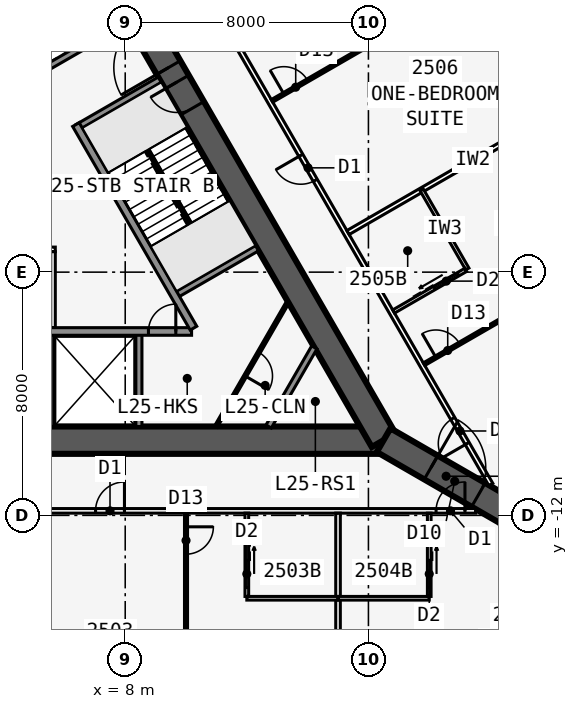
"""IFC4 building model, lengths in metres.
Left out: names, types, materials, properties, quantities, classifications, styles, units other than length and angle.
Written with IfcOpenShell. Run it as: python <this file> out.ifc"""

import sys

from ifc_helpers import new_model, si_unit, direction, frame, frame_2d, origin, place, context, subcontext, project, spatial, rectangle, extrude, element, fill, save


model = new_model("IFC4")
c1 = context("Model", 3, precision=1e-05, world=origin(), true_north=direction((0.0, 1.0)))
c2 = subcontext(c1, "Body", "Model", "MODEL_VIEW")
j1 = project(units=[si_unit("LENGTHUNIT", "METRE"), si_unit("PLANEANGLEUNIT", "RADIAN")], contexts=[c1])
p1 = place(None, origin())
s1 = spatial("IfcSite", under=j1, at=p1, CompositionType="ELEMENT")
p2 = place(p1, origin())
s2 = spatial("IfcBuilding", under=s1, at=p2, CompositionType="ELEMENT")
p3 = place(p2, frame((0.0, 0.0, 96.5)))
s3 = spatial("IfcBuildingStorey", under=s2, at=p3, CompositionType="ELEMENT", Elevation=96.5)
p4 = place(p3, frame((-16.5, -9.526, 0.0), z_axis=(0.0, 0.0, 1.0), x_axis=(1.0, 0.0, 0.0)))
e1 = element("IfcWall", 1, at=p4, inside=s3, PredefinedType="SHEAR", context=c2, shape_type="SweptSolid", body=[
    extrude(rectangle(XDim=33.0, YDim=0.9, at=frame_2d((16.5, 0.0))), origin(), (0.0, 0.0, 1.0), 3.4),
])
p5 = place(p4, frame((14.05, 0.0, 0.0)))
e2 = element("IfcOpeningElement", 2, at=p5, cuts=e1, PredefinedType="OPENING", context=c2, shape_type="SweptSolid", body=[
    extrude(rectangle(XDim=1.8, YDim=2.13, at=frame_2d((0.9, 1.065))), frame((0.0, 0.46, 0.0), z_axis=(0.0, -1.0, 0.0), x_axis=(1.0, 0.0, 0.0)), (0.0, 0.0, 1.0), 0.92),
])
p6 = place(p3, frame((-0.55, -5.951, 0.0), z_axis=(0.0, 0.0, 1.0), x_axis=(1.0, 0.0, 0.0)))
e3 = element("IfcWall", 3, at=p6, inside=s3, PredefinedType="SOLIDWALL", context=c2, shape_type="SweptSolid", body=[
    extrude(rectangle(XDim=10.733, YDim=0.25, at=frame_2d((5.366, 0.0))), origin(), (0.0, 0.0, 1.0), 3.235),
])
p7 = place(p6, frame((9.314, 0.0, 0.0)))
e4 = element("IfcOpeningElement", 4, at=p7, cuts=e3, PredefinedType="OPENING", context=c2, shape_type="SweptSolid", body=[
    extrude(rectangle(XDim=0.9, YDim=2.13, at=frame_2d((0.45, 1.065))), frame((0.0, 0.135, 0.0), z_axis=(0.0, -1.0, 0.0), x_axis=(1.0, 0.0, 0.0)), (0.0, 0.0, 1.0), 0.27),
])
p8 = place(p6, frame((1.05, 0.0, 0.0)))
e5 = element("IfcOpeningElement", 5, at=p8, cuts=e3, PredefinedType="OPENING", context=c2, shape_type="SweptSolid", body=[
    extrude(rectangle(XDim=1.1, YDim=2.13, at=frame_2d((0.55, 1.065))), frame((0.0, 0.135, 0.0), z_axis=(0.0, -1.0, 0.0), x_axis=(1.0, 0.0, 0.0)), (0.0, 0.0, 1.0), 0.27),
])
p9 = place(p6, frame((4.05, 0.0, 0.0)))
e6 = element("IfcOpeningElement", 6, at=p9, cuts=e3, PredefinedType="OPENING", context=c2, shape_type="SweptSolid", body=[
    extrude(rectangle(XDim=1.1, YDim=2.13, at=frame_2d((0.55, 1.065))), frame((0.0, 0.135, 0.0), z_axis=(0.0, -1.0, 0.0), x_axis=(1.0, 0.0, 0.0)), (0.0, 0.0, 1.0), 0.27),
])
for number, where, z_axis, x_axis in (
    (7, (5.55, -5.951, 0.0), (0.0, 0.0, 1.0), (0.0, -1.0, 0.0)),
    (8, (8.45, -5.951, 0.0), (0.0, 0.0, 1.0), (0.0, -1.0, 0.0)),
):
    element("IfcWall", number, at=place(p3, frame(where, z_axis=z_axis, x_axis=x_axis)), inside=s3, PredefinedType="SOLIDWALL", context=c2, shape_type="SweptSolid", body=[
        extrude(rectangle(XDim=3.125, YDim=0.2, at=frame_2d((1.562, 0.0))), origin(), (0.0, 0.0, 1.0), 3.235),
    ])
p10 = place(p3, frame((16.5, -9.526, 0.0), z_axis=(0.0, 0.0, 1.0), x_axis=(-0.499999749417, 0.866025548458, 0.0)))
e9 = element("IfcWall", 9, at=p10, inside=s3, PredefinedType="SHEAR", context=c2, shape_type="SweptSolid", body=[
    extrude(rectangle(XDim=33.0, YDim=0.9, at=frame_2d((16.5, 0.0))), origin(), (0.0, 0.0, 1.0), 3.4),
])
p11 = place(p10, frame((14.15, 0.0, 0.0)))
e10 = element("IfcOpeningElement", 10, at=p11, cuts=e9, PredefinedType="OPENING", context=c2, shape_type="SweptSolid", body=[
    extrude(rectangle(XDim=1.8, YDim=2.13, at=frame_2d((0.9, 1.065))), frame((0.0, 0.46, 0.0), z_axis=(0.0, -1.0, 0.0), x_axis=(1.0, 0.0, 0.0)), (0.0, 0.0, 1.0), 0.92),
])
p12 = place(p10, frame((12.6, 0.0, 0.0)))
e11 = element("IfcOpeningElement", 11, at=p12, cuts=e9, PredefinedType="OPENING", context=c2, shape_type="SweptSolid", body=[
    extrude(rectangle(XDim=1.0, YDim=2.13, at=frame_2d((0.5, 1.065))), frame((0.0, 0.46, 0.0), z_axis=(0.0, -1.0, 0.0), x_axis=(1.0, 0.0, 0.0)), (0.0, 0.0, 1.0), 0.92),
])
p13 = place(p3, frame((10.245, -5.843, 0.0), z_axis=(0.0, 0.0, 1.0), x_axis=(-0.499993009313, 0.866029439822, 0.0)))
e12 = element("IfcWall", 12, at=p13, inside=s3, PredefinedType="SOLIDWALL", context=c2, shape_type="SweptSolid", body=[
    extrude(rectangle(XDim=7.733, YDim=0.25, at=frame_2d((3.866, 0.0))), origin(), (0.0, 0.0, 1.0), 3.235),
])
for number, where, z_axis, x_axis in (
    (13, (9.629, -4.775, 0.0), (0.0, 0.0, 1.0), (0.866, 0.5, 0.0)),
    (14, (6.429, 0.767, 0.0), (0.0, 0.0, 1.0), (0.866, 0.5, 0.0)),
    (15, (5.329, 2.673, 0.0), (0.0, 0.0, 1.0), (0.866, 0.5, 0.0)),
):
    element("IfcWall", number, at=place(p3, frame(where, z_axis=z_axis, x_axis=x_axis)), inside=s3, PredefinedType="SOLIDWALL", context=c2, shape_type="SweptSolid", body=[
        extrude(rectangle(XDim=3.125, YDim=0.2, at=frame_2d((1.562, 0.0))), origin(), (0.0, 0.0, 1.0), 3.235),
    ])
p14 = place(p3, frame((16.5, -9.526, 0.0), z_axis=(0.0, 0.0, 1.0), x_axis=(0.866031398331, -0.499989616998, 0.0)))
e16 = element("IfcWall", 16, at=p14, inside=s3, PredefinedType="SHEAR", context=c2, shape_type="SweptSolid", body=[
    extrude(rectangle(XDim=4.746, YDim=0.9, at=frame_2d((2.373, 0.0))), origin(), (0.0, 0.0, 1.0), 3.4),
])
p15 = place(p14, frame((1.8, 0.0, 0.0)))
e17 = element("IfcOpeningElement", 17, at=p15, cuts=e16, PredefinedType="OPENING", context=c2, shape_type="SweptSolid", body=[
    extrude(rectangle(XDim=1.8, YDim=2.13, at=frame_2d((0.9, 1.065))), frame((0.0, 0.46, 0.0), z_axis=(0.0, -1.0, 0.0), x_axis=(1.0, 0.0, 0.0)), (0.0, 0.0, 1.0), 0.92),
])
p16 = place(p3, frame((-19.527, -11.851, 0.0), z_axis=(0.0, 0.0, 1.0), x_axis=(1.0, 0.0, 0.0)))
e18 = element("IfcWall", 18, at=p16, inside=s3, PredefinedType="PARTITIONING", context=c2, shape_type="SweptSolid", body=[
    extrude(rectangle(XDim=39.054, YDim=0.15, at=frame_2d((19.527, 0.0))), origin(), (0.0, 0.0, 1.0), 3.235),
])
p17 = place(p16, frame((1.558, 0.0, 0.0)))
e19 = element("IfcOpeningElement", 19, at=p17, cuts=e18, PredefinedType="OPENING", context=c2, shape_type="SweptSolid", body=[
    extrude(rectangle(XDim=0.95, YDim=2.13, at=frame_2d((0.475, 1.065))), frame((0.0, 0.085, 0.0), z_axis=(0.0, -1.0, 0.0), x_axis=(1.0, 0.0, 0.0)), (0.0, 0.0, 1.0), 0.17),
])
p18 = place(p16, frame((11.552, 0.0, 0.0)))
e20 = element("IfcOpeningElement", 20, at=p18, cuts=e18, PredefinedType="OPENING", context=c2, shape_type="SweptSolid", body=[
    extrude(rectangle(XDim=0.95, YDim=2.13, at=frame_2d((0.475, 1.065))), frame((0.0, 0.085, 0.0), z_axis=(0.0, -1.0, 0.0), x_axis=(1.0, 0.0, 0.0)), (0.0, 0.0, 1.0), 0.17),
])
p19 = place(p16, frame((21.527, 0.0, 0.0)))
e21 = element("IfcOpeningElement", 21, at=p19, cuts=e18, PredefinedType="OPENING", context=c2, shape_type="SweptSolid", body=[
    extrude(rectangle(XDim=1.0, YDim=2.13, at=frame_2d((0.5, 1.065))), frame((0.0, 0.085, 0.0), z_axis=(0.0, -1.0, 0.0), x_axis=(1.0, 0.0, 0.0)), (0.0, 0.0, 1.0), 0.17),
])
p20 = place(p16, frame((26.552, 0.0, 0.0)))
e22 = element("IfcOpeningElement", 22, at=p20, cuts=e18, PredefinedType="OPENING", context=c2, shape_type="SweptSolid", body=[
    extrude(rectangle(XDim=0.95, YDim=2.13, at=frame_2d((0.475, 1.065))), frame((0.0, 0.085, 0.0), z_axis=(0.0, -1.0, 0.0), x_axis=(1.0, 0.0, 0.0)), (0.0, 0.0, 1.0), 0.17),
])
p21 = place(p16, frame((37.752, 0.0, 0.0)))
e23 = element("IfcOpeningElement", 23, at=p21, cuts=e18, PredefinedType="OPENING", context=c2, shape_type="SweptSolid", body=[
    extrude(rectangle(XDim=0.95, YDim=2.13, at=frame_2d((0.475, 1.065))), frame((0.0, 0.085, 0.0), z_axis=(0.0, -1.0, 0.0), x_axis=(1.0, 0.0, 0.0)), (0.0, 0.0, 1.0), 0.17),
])
p22 = place(p3, frame((10.0, -11.926, 0.0), z_axis=(0.0, 0.0, 1.0), x_axis=(0.0, -1.0, 0.0)))
e24 = element("IfcWall", 24, at=p22, inside=s3, PredefinedType="PARTITIONING", context=c2, shape_type="SweptSolid", body=[
    extrude(rectangle(XDim=9.485, YDim=0.1, at=frame_2d((4.742, 0.0))), origin(), (0.0, 0.0, 1.0), 2.389),
])
p23 = place(p22, frame((0.45, 0.0, 0.0)))
e25 = element("IfcOpeningElement", 25, at=p23, cuts=e24, PredefinedType="OPENING", context=c2, shape_type="SweptSolid", body=[
    extrude(rectangle(XDim=0.9, YDim=2.13, at=frame_2d((0.45, 1.065))), frame((0.0, 0.06, 0.0), z_axis=(0.0, -1.0, 0.0), x_axis=(1.0, 0.0, 0.0)), (0.0, 0.0, 1.0), 0.12),
])
p24 = place(p3, frame((15.0, -11.926, 0.0), z_axis=(0.0, 0.0, 1.0), x_axis=(0.0, -1.0, 0.0)))
e26 = element("IfcWall", 26, at=p24, inside=s3, PredefinedType="PARTITIONING", context=c2, shape_type="SweptSolid", body=[
    extrude(rectangle(XDim=8.72, YDim=0.15, at=frame_2d((4.36, 0.0))), origin(), (0.0, 0.0, 1.0), 2.389),
])
p25 = place(p3, frame((12.0, -14.726, 0.0), z_axis=(0.0, 0.0, 1.0), x_axis=(1.0, 0.0, 0.0)))
e27 = element("IfcWall", 27, at=p25, inside=s3, PredefinedType="PLUMBINGWALL", context=c2, shape_type="SweptSolid", body=[
    extrude(rectangle(XDim=3.0, YDim=0.12, at=frame_2d((1.5, 0.0))), origin(), (0.0, 0.0, 1.0), 3.235),
])
p26 = place(p3, frame((12.0, -11.926, 0.0), z_axis=(0.0, 0.0, 1.0), x_axis=(0.0, -1.0, 0.0)))
e28 = element("IfcWall", 28, at=p26, inside=s3, PredefinedType="PLUMBINGWALL", context=c2, shape_type="SweptSolid", body=[
    extrude(rectangle(XDim=2.74, YDim=0.12, at=frame_2d((1.37, 0.0))), origin(), (0.0, 0.0, 1.0), 3.235),
])
p27 = place(p26, frame((1.55, 0.0, 0.0)))
e29 = element("IfcOpeningElement", 29, at=p27, cuts=e28, PredefinedType="OPENING", context=c2, shape_type="SweptSolid", body=[
    extrude(rectangle(XDim=0.9, YDim=2.13, at=frame_2d((0.45, 1.065))), frame((0.0, 0.07, 0.0), z_axis=(0.0, -1.0, 0.0), x_axis=(1.0, 0.0, 0.0)), (0.0, 0.0, 1.0), 0.14),
])
p28 = place(p3, frame((15.0, -14.726, 0.0), z_axis=(0.0, 0.0, 1.0), x_axis=(1.0, 0.0, 0.0)))
e30 = element("IfcWall", 30, at=p28, inside=s3, PredefinedType="PLUMBINGWALL", context=c2, shape_type="SweptSolid", body=[
    extrude(rectangle(XDim=3.0, YDim=0.12, at=frame_2d((1.5, 0.0))), origin(), (0.0, 0.0, 1.0), 3.235),
])
p29 = place(p3, frame((18.0, -11.926, 0.0), z_axis=(0.0, 0.0, 1.0), x_axis=(0.0, -1.0, 0.0)))
e31 = element("IfcWall", 31, at=p29, inside=s3, PredefinedType="PLUMBINGWALL", context=c2, shape_type="SweptSolid", body=[
    extrude(rectangle(XDim=2.74, YDim=0.12, at=frame_2d((1.37, 0.0))), origin(), (0.0, 0.0, 1.0), 3.235),
])
p30 = place(p29, frame((1.55, 0.0, 0.0)))
e32 = element("IfcOpeningElement", 32, at=p30, cuts=e31, PredefinedType="OPENING", context=c2, shape_type="SweptSolid", body=[
    extrude(rectangle(XDim=0.9, YDim=2.13, at=frame_2d((0.45, 1.065))), frame((0.0, 0.07, 0.0), z_axis=(0.0, -1.0, 0.0), x_axis=(1.0, 0.0, 0.0)), (0.0, 0.0, 1.0), 0.14),
])
p31 = place(p3, frame((20.027, -10.985, 0.0), z_axis=(0.0, 0.0, 1.0), x_axis=(-0.500001677587, 0.866024435227, 0.0)))
e33 = element("IfcWall", 33, at=p31, inside=s3, PredefinedType="PARTITIONING", context=c2, shape_type="SweptSolid", body=[
    extrude(rectangle(XDim=39.054, YDim=0.15, at=frame_2d((19.527, 0.0))), origin(), (0.0, 0.0, 1.0), 3.235),
])
p32 = place(p31, frame((1.558, 0.0, 0.0)))
e34 = element("IfcOpeningElement", 34, at=p32, cuts=e33, PredefinedType="OPENING", context=c2, shape_type="SweptSolid", body=[
    extrude(rectangle(XDim=0.95, YDim=2.13, at=frame_2d((0.475, 1.065))), frame((0.0, 0.085, 0.0), z_axis=(0.0, -1.0, 0.0), x_axis=(1.0, 0.0, 0.0)), (0.0, 0.0, 1.0), 0.17),
])
p33 = place(p31, frame((11.552, 0.0, 0.0)))
e35 = element("IfcOpeningElement", 35, at=p33, cuts=e33, PredefinedType="OPENING", context=c2, shape_type="SweptSolid", body=[
    extrude(rectangle(XDim=0.95, YDim=2.13, at=frame_2d((0.475, 1.065))), frame((0.0, 0.085, 0.0), z_axis=(0.0, -1.0, 0.0), x_axis=(1.0, 0.0, 0.0)), (0.0, 0.0, 1.0), 0.17),
])
p34 = place(p31, frame((22.752, 0.0, 0.0)))
e36 = element("IfcOpeningElement", 36, at=p34, cuts=e33, PredefinedType="OPENING", context=c2, shape_type="SweptSolid", body=[
    extrude(rectangle(XDim=0.95, YDim=2.13, at=frame_2d((0.475, 1.065))), frame((0.0, 0.085, 0.0), z_axis=(0.0, -1.0, 0.0), x_axis=(1.0, 0.0, 0.0)), (0.0, 0.0, 1.0), 0.17),
])
p35 = place(p31, frame((36.546, 0.0, 0.0)))
e37 = element("IfcOpeningElement", 37, at=p35, cuts=e33, PredefinedType="OPENING", context=c2, shape_type="SweptSolid", body=[
    extrude(rectangle(XDim=0.95, YDim=2.13, at=frame_2d((0.475, 1.065))), frame((0.0, 0.085, 0.0), z_axis=(0.0, -1.0, 0.0), x_axis=(1.0, 0.0, 0.0)), (0.0, 0.0, 1.0), 0.17),
])
p36 = place(p3, frame((17.829, -7.027, 0.0), z_axis=(0.0, 0.0, 1.0), x_axis=(0.866032659912, 0.499987431809, 0.0)))
e38 = element("IfcWall", 38, at=p36, inside=s3, PredefinedType="PARTITIONING", context=c2, shape_type="SweptSolid", body=[
    extrude(rectangle(XDim=8.72, YDim=0.1, at=frame_2d((4.36, 0.0))), origin(), (0.0, 0.0, 1.0), 2.389),
])
p37 = place(p36, frame((0.45, 0.0, 0.0)))
e39 = element("IfcOpeningElement", 39, at=p37, cuts=e38, PredefinedType="OPENING", context=c2, shape_type="SweptSolid", body=[
    extrude(rectangle(XDim=0.9, YDim=2.13, at=frame_2d((0.45, 1.065))), frame((0.0, 0.06, 0.0), z_axis=(0.0, -1.0, 0.0), x_axis=(1.0, 0.0, 0.0)), (0.0, 0.0, 1.0), 0.12),
])
p38 = place(p3, frame((15.329, -2.697, 0.0), z_axis=(0.0, 0.0, 1.0), x_axis=(0.866018409083, 0.500012114982, 0.0)))
e40 = element("IfcWall", 40, at=p38, inside=s3, PredefinedType="PARTITIONING", context=c2, shape_type="SweptSolid", body=[
    extrude(rectangle(XDim=9.485, YDim=0.15, at=frame_2d((4.742, 0.0))), origin(), (0.0, 0.0, 1.0), 2.389),
])
p39 = place(p3, frame((12.829, 1.633, 0.0), z_axis=(0.0, 0.0, 1.0), x_axis=(0.866026934769, 0.499997348248, 0.0)))
e41 = element("IfcWall", 41, at=p39, inside=s3, PredefinedType="PARTITIONING", context=c2, shape_type="SweptSolid", body=[
    extrude(rectangle(XDim=9.943, YDim=0.1, at=frame_2d((4.971, 0.0))), origin(), (0.0, 0.0, 1.0), 2.389),
])
p40 = place(p39, frame((0.45, 0.0, 0.0)))
e42 = element("IfcOpeningElement", 42, at=p40, cuts=e41, PredefinedType="OPENING", context=c2, shape_type="SweptSolid", body=[
    extrude(rectangle(XDim=0.9, YDim=2.13, at=frame_2d((0.45, 1.065))), frame((0.0, 0.06, 0.0), z_axis=(0.0, -1.0, 0.0), x_axis=(1.0, 0.0, 0.0)), (0.0, 0.0, 1.0), 0.12),
])
p41 = place(p3, frame((19.253, -3.895, 0.0), z_axis=(0.0, 0.0, 1.0), x_axis=(-0.499990139034, 0.866031096941, 0.0)))
e43 = element("IfcWall", 43, at=p41, inside=s3, PredefinedType="PLUMBINGWALL", context=c2, shape_type="SweptSolid", body=[
    extrude(rectangle(XDim=3.0, YDim=0.12, at=frame_2d((1.5, 0.0))), origin(), (0.0, 0.0, 1.0), 3.235),
])
p42 = place(p3, frame((16.829, -5.295, 0.0), z_axis=(0.0, 0.0, 1.0), x_axis=(0.866035715982, 0.499982138324, 0.0)))
e44 = element("IfcWall", 44, at=p42, inside=s3, PredefinedType="PLUMBINGWALL", context=c2, shape_type="SweptSolid", body=[
    extrude(rectangle(XDim=2.74, YDim=0.12, at=frame_2d((1.37, 0.0))), origin(), (0.0, 0.0, 1.0), 3.235),
])
p43 = place(p42, frame((1.55, 0.0, 0.0)))
e45 = element("IfcOpeningElement", 45, at=p43, cuts=e44, PredefinedType="OPENING", context=c2, shape_type="SweptSolid", body=[
    extrude(rectangle(XDim=0.9, YDim=2.13, at=frame_2d((0.45, 1.065))), frame((0.0, 0.07, 0.0), z_axis=(0.0, -1.0, 0.0), x_axis=(1.0, 0.0, 0.0)), (0.0, 0.0, 1.0), 0.14),
])
p44 = place(p3, frame((-2.65, -3.251, 0.0), z_axis=(0.0, 0.0, 1.0), x_axis=(1.0, 0.0, 0.0)))
e46 = element("IfcWall", 46, at=p44, inside=s3, PredefinedType="PARTITIONING", context=c2, shape_type="SweptSolid", body=[
    extrude(rectangle(XDim=8.35, YDim=0.15, at=frame_2d((4.175, 0.0))), origin(), (0.0, 0.0, 1.0), 3.235),
])
p45 = place(p3, frame((5.625, -5.826, 0.0), z_axis=(0.0, 0.0, 1.0), x_axis=(0.0, 1.0, 0.0)))
e47 = element("IfcWall", 47, at=p45, inside=s3, PredefinedType="PARTITIONING", context=c2, shape_type="SweptSolid", body=[
    extrude(rectangle(XDim=2.5, YDim=0.15, at=frame_2d((1.25, 0.0))), origin(), (0.0, 0.0, 1.0), 3.235),
])
p46 = place(p3, frame((14.219, -6.476, 0.0), z_axis=(0.0, 0.0, 1.0), x_axis=(-0.499952404951, -0.866052881055, 0.0)))
e48 = element("IfcWall", 48, at=p46, inside=s3, PredefinedType="SOLIDWALL", context=c2, shape_type="SweptSolid", body=[
    extrude(rectangle(XDim=3.002, YDim=0.2, at=frame_2d((1.501, 0.0))), origin(), (0.0, 0.0, 1.0), 3.235),
])
p47 = place(p3, frame((13.354, -4.976, 0.0), z_axis=(0.0, 0.0, 1.0), x_axis=(-0.499999210213, -0.866025859768, 0.0)))
e49 = element("IfcWall", 49, at=p47, inside=s3, PredefinedType="PARTITIONING", context=c2, shape_type="SweptSolid", body=[
    extrude(rectangle(XDim=4.734, YDim=0.1, at=frame_2d((2.367, 0.0))), origin(), (0.0, 0.0, 1.0), 3.235),
])
p48 = place(p47, frame((1.917, 0.0, 0.0)))
e50 = element("IfcOpeningElement", 50, at=p48, cuts=e49, PredefinedType="OPENING", context=c2, shape_type="SweptSolid", body=[
    extrude(rectangle(XDim=0.9, YDim=2.13, at=frame_2d((0.45, 1.065))), frame((0.0, 0.06, 0.0), z_axis=(0.0, -1.0, 0.0), x_axis=(1.0, 0.0, 0.0)), (0.0, 0.0, 1.0), 0.12),
])
p49 = place(p3, frame((10.135, -2.401, 0.0), z_axis=(0.0, 0.0, 1.0), x_axis=(-0.499992232847, 0.866029888106, 0.0)))
e51 = element("IfcWall", 51, at=p49, inside=s3, PredefinedType="SOLIDWALL", context=c2, shape_type="SweptSolid", body=[
    extrude(rectangle(XDim=2.794, YDim=0.1, at=frame_2d((1.397, 0.0))), origin(), (0.0, 0.0, 1.0), 3.4),
])
p50 = place(p23, origin())
e52 = element("IfcDoor", 52, at=p50, inside=s3, OperationType="SINGLE_SWING_LEFT", PredefinedType="DOOR", context=c2, shape_type="SweptSolid", body=[
    extrude(rectangle(XDim=0.9, YDim=2.13, at=frame_2d((0.45, 1.065))), frame((0.0, 0.025, 0.0), z_axis=(0.0, -1.0, 0.0), x_axis=(1.0, 0.0, 0.0)), (0.0, 0.0, 1.0), 0.05),
])
fill(e25, e52)
p51 = place(p20, origin())
e53 = element("IfcDoor", 53, at=p51, inside=s3, OperationType="SINGLE_SWING_RIGHT", PredefinedType="DOOR", context=c2, shape_type="SweptSolid", body=[
    extrude(rectangle(XDim=0.95, YDim=2.13, at=frame_2d((0.475, 1.065))), frame((0.0, 0.025, 0.0), z_axis=(0.0, -1.0, 0.0), x_axis=(1.0, 0.0, 0.0)), (0.0, 0.0, 1.0), 0.05),
])
fill(e22, e53)
p52 = place(p27, origin())
e54 = element("IfcDoor", 54, at=p52, inside=s3, OperationType="SLIDING_TO_LEFT", PredefinedType="DOOR", context=c2, shape_type="SweptSolid", body=[
    extrude(rectangle(XDim=0.9, YDim=2.13, at=frame_2d((0.45, 1.065))), frame((0.0, 0.025, 0.0), z_axis=(0.0, -1.0, 0.0), x_axis=(1.0, 0.0, 0.0)), (0.0, 0.0, 1.0), 0.05),
])
fill(e29, e54)
p53 = place(p30, origin())
e55 = element("IfcDoor", 55, at=p53, inside=s3, OperationType="SLIDING_TO_LEFT", PredefinedType="DOOR", context=c2, shape_type="SweptSolid", body=[
    extrude(rectangle(XDim=0.9, YDim=2.13, at=frame_2d((0.45, 1.065))), frame((0.0, 0.025, 0.0), z_axis=(0.0, -1.0, 0.0), x_axis=(1.0, 0.0, 0.0)), (0.0, 0.0, 1.0), 0.05),
])
fill(e32, e55)
p54 = place(p21, origin())
e56 = element("IfcDoor", 56, at=p54, inside=s3, OperationType="SINGLE_SWING_RIGHT", PredefinedType="DOOR", context=c2, shape_type="SweptSolid", body=[
    extrude(rectangle(XDim=0.95, YDim=2.13, at=frame_2d((0.475, 1.065))), frame((0.0, 0.025, 0.0), z_axis=(0.0, -1.0, 0.0), x_axis=(1.0, 0.0, 0.0)), (0.0, 0.0, 1.0), 0.05),
])
fill(e23, e56)
p55 = place(p37, origin())
e57 = element("IfcDoor", 57, at=p55, inside=s3, OperationType="SINGLE_SWING_LEFT", PredefinedType="DOOR", context=c2, shape_type="SweptSolid", body=[
    extrude(rectangle(XDim=0.9, YDim=2.13, at=frame_2d((0.45, 1.065))), frame((0.0, 0.025, 0.0), z_axis=(0.0, -1.0, 0.0), x_axis=(1.0, 0.0, 0.0)), (0.0, 0.0, 1.0), 0.05),
])
fill(e39, e57)
p56 = place(p40, origin())
e58 = element("IfcDoor", 58, at=p56, inside=s3, OperationType="SINGLE_SWING_LEFT", PredefinedType="DOOR", context=c2, shape_type="SweptSolid", body=[
    extrude(rectangle(XDim=0.9, YDim=2.13, at=frame_2d((0.45, 1.065))), frame((0.0, 0.025, 0.0), z_axis=(0.0, -1.0, 0.0), x_axis=(1.0, 0.0, 0.0)), (0.0, 0.0, 1.0), 0.05),
])
fill(e42, e58)
p57 = place(p32, origin())
e59 = element("IfcDoor", 59, at=p57, inside=s3, OperationType="SINGLE_SWING_LEFT", PredefinedType="DOOR", context=c2, shape_type="SweptSolid", body=[
    extrude(rectangle(XDim=0.95, YDim=2.13, at=frame_2d((0.475, 1.065))), frame((0.0, 0.025, 0.0), z_axis=(0.0, -1.0, 0.0), x_axis=(1.0, 0.0, 0.0)), (0.0, 0.0, 1.0), 0.05),
])
fill(e34, e59)
p58 = place(p43, origin())
e60 = element("IfcDoor", 60, at=p58, inside=s3, OperationType="SLIDING_TO_LEFT", PredefinedType="DOOR", context=c2, shape_type="SweptSolid", body=[
    extrude(rectangle(XDim=0.9, YDim=2.13, at=frame_2d((0.45, 1.065))), frame((0.0, 0.025, 0.0), z_axis=(0.0, -1.0, 0.0), x_axis=(1.0, 0.0, 0.0)), (0.0, 0.0, 1.0), 0.05),
])
fill(e45, e60)
p59 = place(p33, origin())
e61 = element("IfcDoor", 61, at=p59, inside=s3, OperationType="SINGLE_SWING_RIGHT", PredefinedType="DOOR", context=c2, shape_type="SweptSolid", body=[
    extrude(rectangle(XDim=0.95, YDim=2.13, at=frame_2d((0.475, 1.065))), frame((0.0, 0.025, 0.0), z_axis=(0.0, -1.0, 0.0), x_axis=(1.0, 0.0, 0.0)), (0.0, 0.0, 1.0), 0.05),
])
fill(e35, e61)
p60 = place(p11, origin())
e62 = element("IfcDoor", 62, at=p60, inside=s3, OperationType="DOUBLE_DOOR_SINGLE_SWING", PredefinedType="DOOR", context=c2, shape_type="SweptSolid", body=[
    extrude(rectangle(XDim=1.8, YDim=2.13, at=frame_2d((0.9, 1.065))), frame((0.0, 0.025, 0.0), z_axis=(0.0, -1.0, 0.0), x_axis=(1.0, 0.0, 0.0)), (0.0, 0.0, 1.0), 0.05),
])
fill(e10, e62)
p61 = place(p12, origin())
e63 = element("IfcDoor", 63, at=p61, inside=s3, OperationType="SINGLE_SWING_RIGHT", PredefinedType="DOOR", context=c2, shape_type="SweptSolid", body=[
    extrude(rectangle(XDim=1.0, YDim=2.13, at=frame_2d((0.5, 1.065))), frame((0.0, 0.025, 0.0), z_axis=(0.0, -1.0, 0.0), x_axis=(1.0, 0.0, 0.0)), (0.0, 0.0, 1.0), 0.05),
])
fill(e11, e63)
p62 = place(p15, origin())
e64 = element("IfcDoor", 64, at=p62, inside=s3, OperationType="DOUBLE_DOOR_DOUBLE_SWING", PredefinedType="DOOR", context=c2, shape_type="SweptSolid", body=[
    extrude(rectangle(XDim=1.8, YDim=2.13, at=frame_2d((0.9, 1.065))), frame((0.0, 0.025, 0.0), z_axis=(0.0, -1.0, 0.0), x_axis=(1.0, 0.0, 0.0)), (0.0, 0.0, 1.0), 0.05),
])
fill(e17, e64)
p63 = place(p48, origin())
e65 = element("IfcDoor", 65, at=p63, inside=s3, OperationType="SINGLE_SWING_RIGHT", PredefinedType="DOOR", context=c2, shape_type="SweptSolid", body=[
    extrude(rectangle(XDim=0.9, YDim=2.13, at=frame_2d((0.45, 1.065))), frame((0.0, 0.025, 0.0), z_axis=(0.0, -1.0, 0.0), x_axis=(1.0, 0.0, 0.0)), (0.0, 0.0, 1.0), 0.05),
])
fill(e50, e65)
p64 = place(p7, origin())
e66 = element("IfcDoor", 66, at=p64, inside=s3, OperationType="SINGLE_SWING_RIGHT", PredefinedType="DOOR", context=c2, shape_type="SweptSolid", body=[
    extrude(rectangle(XDim=0.9, YDim=2.13, at=frame_2d((0.45, 1.065))), frame((0.0, 0.025, 0.0), z_axis=(0.0, -1.0, 0.0), x_axis=(1.0, 0.0, 0.0)), (0.0, 0.0, 1.0), 0.05),
])
fill(e4, e66)
save(model, sys.argv[1])
